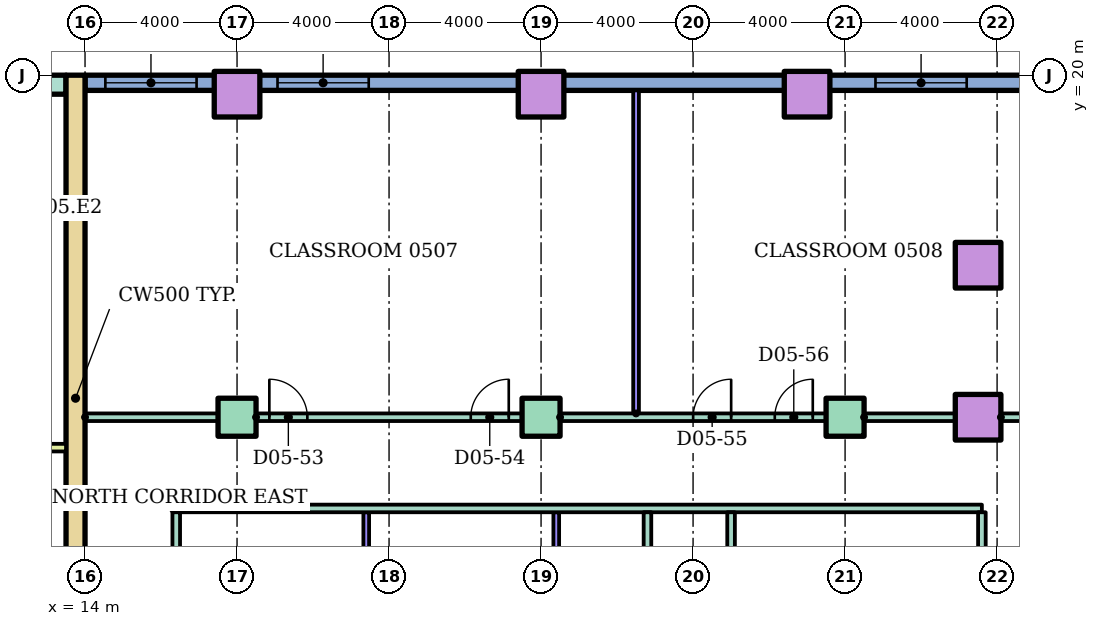
"""IFC4 building model, lengths in metres.
Left out: names, types, materials, properties, quantities, classifications, styles, units other than length and angle.
Written with IfcOpenShell. Run it as: python <this file> out.ifc"""

import sys

from ifc_helpers import new_model, si_unit, direction, frame, frame_2d, origin, origin_2d, place, context, subcontext, project, spatial, rectangle, hollow_rectangle, extrude, element, fill, save


model = new_model("IFC4")
c1 = context("Model", 3, precision=1e-05, world=origin(), true_north=direction((0.0, 1.0)))
c2 = subcontext(c1, "Body", "Model", "MODEL_VIEW")
j1 = project(units=[si_unit("LENGTHUNIT", "METRE"), si_unit("PLANEANGLEUNIT", "RADIAN")], contexts=[c1])
p1 = place(None, origin())
s1 = spatial("IfcSite", under=j1, at=p1, CompositionType="ELEMENT")
p2 = place(p1, origin())
s2 = spatial("IfcBuilding", under=s1, at=p2, CompositionType="ELEMENT")
p3 = place(p2, frame((0.0, 0.0, 22.0)))
s3 = spatial("IfcBuildingStorey", under=s2, at=p3, CompositionType="ELEMENT", Elevation=22.0)
for number, where in (
    (1, (18.0, 11.0, 0.0)),
    (2, (26.0, 11.0, 0.0)),
    (3, (34.0, 11.0, 0.0)),
):
    element("IfcColumn", number, at=place(p3, frame(where)), inside=s3, PredefinedType="COLUMN", context=c2, shape_type="SweptSolid", body=[
        extrude(rectangle(XDim=1.0, YDim=1.0, at=origin_2d()), origin(), (0.0, 0.0, 1.0), 4.0),
    ])
for number, where in (
    (4, (37.5, 11.0, 0.0)),
    (5, (37.5, 15.0, 0.0)),
    (6, (18.0, 19.5, 0.0)),
    (7, (26.0, 19.5, 0.0)),
    (8, (33.0, 19.5, 0.0)),
):
    element("IfcColumn", number, at=place(p3, frame(where)), inside=s3, PredefinedType="COLUMN", context=c2, shape_type="SweptSolid", body=[
        extrude(hollow_rectangle(XDim=1.2, YDim=1.2, WallThickness=0.06, at=origin_2d()), origin(), (0.0, 0.0, 1.0), 4.0),
    ])
p4 = place(p3, frame((39.6, 19.8, 0.0), z_axis=(0.0, 0.0, 1.0), x_axis=(-1.0, 0.0, 0.0)))
e9 = element("IfcWall", 9, at=p4, inside=s3, PredefinedType="STANDARD", context=c2, shape_type="SweptSolid", body=[
    extrude(rectangle(XDim=25.6, YDim=0.4, at=frame_2d((12.8, 0.0))), origin(), (0.0, 0.0, 1.0), 3.7),
])
p5 = place(p4, frame((2.4, 0.0, 0.9)))
e10 = element("IfcOpeningElement", 10, at=p5, cuts=e9, PredefinedType="OPENING", context=c2, shape_type="SweptSolid", body=[
    extrude(rectangle(XDim=2.4, YDim=2.1, at=frame_2d((1.2, 1.05))), frame((0.0, 0.21, 0.0), z_axis=(0.0, -1.0, 0.0), x_axis=(1.0, 0.0, 0.0)), (0.0, 0.0, 1.0), 0.42),
])
p6 = place(p4, frame((18.135, 0.0, 0.9)))
e11 = element("IfcOpeningElement", 11, at=p6, cuts=e9, PredefinedType="OPENING", context=c2, shape_type="SweptSolid", body=[
    extrude(rectangle(XDim=2.4, YDim=2.1, at=frame_2d((1.2, 1.05))), frame((0.0, 0.21, 0.0), z_axis=(0.0, -1.0, 0.0), x_axis=(1.0, 0.0, 0.0)), (0.0, 0.0, 1.0), 0.42),
])
p7 = place(p4, frame((22.665, 0.0, 0.9)))
e12 = element("IfcOpeningElement", 12, at=p7, cuts=e9, PredefinedType="OPENING", context=c2, shape_type="SweptSolid", body=[
    extrude(rectangle(XDim=2.4, YDim=2.1, at=frame_2d((1.2, 1.05))), frame((0.0, 0.21, 0.0), z_axis=(0.0, -1.0, 0.0), x_axis=(1.0, 0.0, 0.0)), (0.0, 0.0, 1.0), 0.42),
])
p8 = place(p3, frame((13.75, 3.0, 0.0), z_axis=(0.0, 0.0, 1.0), x_axis=(0.0, 1.0, 0.0)))
e13 = element("IfcWall", 13, at=p8, inside=s3, PredefinedType="SHEAR", context=c2, shape_type="SweptSolid", body=[
    extrude(rectangle(XDim=17.0, YDim=0.5, at=frame_2d((8.5, 0.0))), origin(), (0.0, 0.0, 1.0), 3.2),
])
p9 = place(p3, frame((-13.5, 19.75, 0.0)))
e14 = element("IfcWall", 14, at=p9, inside=s3, PredefinedType="SHEAR", context=c2, shape_type="SweptSolid", body=[
    extrude(rectangle(XDim=27.0, YDim=0.5, at=frame_2d((13.5, 0.0))), origin(), (0.0, 0.0, 1.0), 3.2),
])
p10 = place(p3, frame((9.6, 10.2, 0.0)))
e15 = element("IfcWall", 15, at=p10, inside=s3, PredefinedType="PARTITIONING", context=c2, shape_type="SweptSolid", body=[
    extrude(rectangle(XDim=3.9, YDim=0.2, at=frame_2d((1.95, 0.0))), origin(), (0.0, 0.0, 1.0), 3.2),
])
p11 = place(p3, frame((16.3, 8.6, 0.0)))
e16 = element("IfcWall", 16, at=p11, inside=s3, PredefinedType="PARTITIONING", context=c2, shape_type="SweptSolid", body=[
    extrude(rectangle(XDim=21.3, YDim=0.2, at=frame_2d((10.65, 0.0))), origin(), (0.0, 0.0, 1.0), 3.2),
])
p12 = place(p3, frame((14.0, 11.0, 0.0)))
e17 = element("IfcWall", 17, at=p12, inside=s3, PredefinedType="PARTITIONING", context=c2, shape_type="SweptSolid", body=[
    extrude(rectangle(XDim=3.5, YDim=0.2, at=frame_2d((1.75, 0.0))), origin(), (0.0, 0.0, 1.0), 3.2),
])
p13 = place(p3, frame((18.5, 11.0, 0.0)))
e18 = element("IfcWall", 18, at=p13, inside=s3, PredefinedType="PARTITIONING", context=c2, shape_type="SweptSolid", body=[
    extrude(rectangle(XDim=7.0, YDim=0.2, at=frame_2d((3.5, 0.0))), origin(), (0.0, 0.0, 1.0), 3.2),
])
p14 = place(p13, frame((0.35, 0.0, 0.0)))
e19 = element("IfcOpeningElement", 19, at=p14, cuts=e18, PredefinedType="OPENING", context=c2, shape_type="SweptSolid", body=[
    extrude(rectangle(XDim=1.0, YDim=2.1, at=frame_2d((0.5, 1.05))), frame((0.0, 0.11, 0.0), z_axis=(0.0, -1.0, 0.0), x_axis=(1.0, 0.0, 0.0)), (0.0, 0.0, 1.0), 0.22),
])
p15 = place(p13, frame((5.65, 0.0, 0.0)))
e20 = element("IfcOpeningElement", 20, at=p15, cuts=e18, PredefinedType="OPENING", context=c2, shape_type="SweptSolid", body=[
    extrude(rectangle(XDim=1.0, YDim=2.1, at=frame_2d((0.5, 1.05))), frame((0.0, 0.11, 0.0), z_axis=(0.0, -1.0, 0.0), x_axis=(1.0, 0.0, 0.0)), (0.0, 0.0, 1.0), 0.22),
])
p16 = place(p3, frame((26.5, 11.0, 0.0)))
e21 = element("IfcWall", 21, at=p16, inside=s3, PredefinedType="PARTITIONING", context=c2, shape_type="SweptSolid", body=[
    extrude(rectangle(XDim=7.0, YDim=0.2, at=frame_2d((3.5, 0.0))), origin(), (0.0, 0.0, 1.0), 3.2),
])
p17 = place(p16, frame((3.502, 0.0, 0.0)))
e22 = element("IfcOpeningElement", 22, at=p17, cuts=e21, PredefinedType="OPENING", context=c2, shape_type="SweptSolid", body=[
    extrude(rectangle(XDim=1.0, YDim=2.1, at=frame_2d((0.5, 1.05))), frame((0.0, 0.11, 0.0), z_axis=(0.0, -1.0, 0.0), x_axis=(1.0, 0.0, 0.0)), (0.0, 0.0, 1.0), 0.22),
])
p18 = place(p16, frame((5.65, 0.0, 0.0)))
e23 = element("IfcOpeningElement", 23, at=p18, cuts=e21, PredefinedType="OPENING", context=c2, shape_type="SweptSolid", body=[
    extrude(rectangle(XDim=1.0, YDim=2.1, at=frame_2d((0.5, 1.05))), frame((0.0, 0.11, 0.0), z_axis=(0.0, -1.0, 0.0), x_axis=(1.0, 0.0, 0.0)), (0.0, 0.0, 1.0), 0.22),
])
p19 = place(p3, frame((34.5, 11.0, 0.0)))
e24 = element("IfcWall", 24, at=p19, inside=s3, PredefinedType="PARTITIONING", context=c2, shape_type="SweptSolid", body=[
    extrude(rectangle(XDim=2.4, YDim=0.2, at=frame_2d((1.2, 0.0))), origin(), (0.0, 0.0, 1.0), 3.2),
])
p20 = place(p3, frame((38.1, 11.0, 0.0)))
e25 = element("IfcWall", 25, at=p20, inside=s3, PredefinedType="PARTITIONING", context=c2, shape_type="SweptSolid", body=[
    extrude(rectangle(XDim=1.5, YDim=0.2, at=frame_2d((0.75, 0.0))), origin(), (0.0, 0.0, 1.0), 3.2),
])
p21 = place(p3, frame((16.4, 1.5, 0.0), z_axis=(0.0, 0.0, 1.0), x_axis=(0.0, 1.0, 0.0)))
e26 = element("IfcWall", 26, at=p21, inside=s3, PredefinedType="PARTITIONING", context=c2, shape_type="SweptSolid", body=[
    extrude(rectangle(XDim=7.0, YDim=0.2, at=frame_2d((3.5, 0.0))), origin(), (0.0, 0.0, 1.0), 3.2),
])
p22 = place(p3, frame((21.4, 1.5, 0.0), z_axis=(0.0, 0.0, 1.0), x_axis=(0.0, 1.0, 0.0)))
e27 = element("IfcWall", 27, at=p22, inside=s3, PredefinedType="PARTITIONING", context=c2, shape_type="SweptSolid", body=[
    extrude(rectangle(XDim=7.0, YDim=0.15, at=frame_2d((3.5, 0.0))), origin(), (0.0, 0.0, 1.0), 3.2),
])
p23 = place(p3, frame((26.4, 2.5, 0.0), z_axis=(0.0, 0.0, 1.0), x_axis=(0.0, 1.0, 0.0)))
e28 = element("IfcWall", 28, at=p23, inside=s3, PredefinedType="PARTITIONING", context=c2, shape_type="SweptSolid", body=[
    extrude(rectangle(XDim=6.0, YDim=0.15, at=frame_2d((3.0, 0.0))), origin(), (0.0, 0.0, 1.0), 3.2),
])
p24 = place(p3, frame((28.5, 11.1, 0.0), z_axis=(0.0, 0.0, 1.0), x_axis=(0.0, 1.0, 0.0)))
e29 = element("IfcWall", 29, at=p24, inside=s3, PredefinedType="PARTITIONING", context=c2, shape_type="SweptSolid", body=[
    extrude(rectangle(XDim=8.5, YDim=0.15, at=frame_2d((4.25, 0.0))), origin(), (0.0, 0.0, 1.0), 3.2),
])
for number, where, z_axis, x_axis in (
    (30, (28.8, 1.5, 0.0), (0.0, 0.0, 1.0), (0.0, 1.0, 0.0)),
    (31, (31.0, 1.5, 0.0), (0.0, 0.0, 1.0), (0.0, 1.0, 0.0)),
):
    element("IfcWall", number, at=place(p3, frame(where, z_axis=z_axis, x_axis=x_axis)), inside=s3, PredefinedType="PARTITIONING", context=c2, shape_type="SweptSolid", body=[
        extrude(rectangle(XDim=7.0, YDim=0.2, at=frame_2d((3.5, 0.0))), origin(), (0.0, 0.0, 1.0), 3.2),
    ])
p25 = place(p3, frame((37.6, 2.6, 0.0), z_axis=(0.0, 0.0, 1.0), x_axis=(0.0, 1.0, 0.0)))
e32 = element("IfcWall", 32, at=p25, inside=s3, PredefinedType="PARTITIONING", context=c2, shape_type="SweptSolid", body=[
    extrude(rectangle(XDim=5.9, YDim=0.2, at=frame_2d((2.95, 0.0))), origin(), (0.0, 0.0, 1.0), 3.2),
])
p26 = place(p25, frame((1.95, 0.0, 0.0)))
e33 = element("IfcOpeningElement", 33, at=p26, cuts=e32, PredefinedType="OPENING", context=c2, shape_type="SweptSolid", body=[
    extrude(rectangle(XDim=0.9, YDim=2.1, at=frame_2d((0.45, 1.05))), frame((0.0, 0.11, 0.0), z_axis=(0.0, -1.0, 0.0), x_axis=(1.0, 0.0, 0.0)), (0.0, 0.0, 1.0), 0.22),
])
p27 = place(p5, origin())
e34 = element("IfcWindow", 34, at=p27, inside=s3, PartitioningType="SINGLE_PANEL", PredefinedType="WINDOW", context=c2, shape_type="SweptSolid", body=[
    extrude(rectangle(XDim=2.4, YDim=2.1, at=frame_2d((1.2, 1.05))), frame((0.0, 0.03, 0.0), z_axis=(0.0, -1.0, 0.0), x_axis=(1.0, 0.0, 0.0)), (0.0, 0.0, 1.0), 0.06),
])
fill(e10, e34)
p28 = place(p6, origin())
e35 = element("IfcWindow", 35, at=p28, inside=s3, PartitioningType="SINGLE_PANEL", PredefinedType="WINDOW", context=c2, shape_type="SweptSolid", body=[
    extrude(rectangle(XDim=2.4, YDim=2.1, at=frame_2d((1.2, 1.05))), frame((0.0, 0.03, 0.0), z_axis=(0.0, -1.0, 0.0), x_axis=(1.0, 0.0, 0.0)), (0.0, 0.0, 1.0), 0.06),
])
fill(e11, e35)
p29 = place(p7, origin())
e36 = element("IfcWindow", 36, at=p29, inside=s3, PartitioningType="SINGLE_PANEL", PredefinedType="WINDOW", context=c2, shape_type="SweptSolid", body=[
    extrude(rectangle(XDim=2.4, YDim=2.1, at=frame_2d((1.2, 1.05))), frame((0.0, 0.03, 0.0), z_axis=(0.0, -1.0, 0.0), x_axis=(1.0, 0.0, 0.0)), (0.0, 0.0, 1.0), 0.06),
])
fill(e12, e36)
p30 = place(p14, origin())
e37 = element("IfcDoor", 37, at=p30, inside=s3, OperationType="SINGLE_SWING_LEFT", PredefinedType="DOOR", context=c2, shape_type="SweptSolid", body=[
    extrude(rectangle(XDim=1.0, YDim=2.1, at=frame_2d((0.5, 1.05))), frame((0.0, 0.025, 0.0), z_axis=(0.0, -1.0, 0.0), x_axis=(1.0, 0.0, 0.0)), (0.0, 0.0, 1.0), 0.05),
])
fill(e19, e37)
p31 = place(p15, origin())
e38 = element("IfcDoor", 38, at=p31, inside=s3, OperationType="SINGLE_SWING_RIGHT", PredefinedType="DOOR", context=c2, shape_type="SweptSolid", body=[
    extrude(rectangle(XDim=1.0, YDim=2.1, at=frame_2d((0.5, 1.05))), frame((0.0, 0.025, 0.0), z_axis=(0.0, -1.0, 0.0), x_axis=(1.0, 0.0, 0.0)), (0.0, 0.0, 1.0), 0.05),
])
fill(e20, e38)
p32 = place(p17, origin())
e39 = element("IfcDoor", 39, at=p32, inside=s3, OperationType="SINGLE_SWING_RIGHT", PredefinedType="DOOR", context=c2, shape_type="SweptSolid", body=[
    extrude(rectangle(XDim=1.0, YDim=2.1, at=frame_2d((0.5, 1.05))), frame((0.0, 0.025, 0.0), z_axis=(0.0, -1.0, 0.0), x_axis=(1.0, 0.0, 0.0)), (0.0, 0.0, 1.0), 0.05),
])
fill(e22, e39)
p33 = place(p18, origin())
e40 = element("IfcDoor", 40, at=p33, inside=s3, OperationType="SINGLE_SWING_RIGHT", PredefinedType="DOOR", context=c2, shape_type="SweptSolid", body=[
    extrude(rectangle(XDim=1.0, YDim=2.1, at=frame_2d((0.5, 1.05))), frame((0.0, 0.025, 0.0), z_axis=(0.0, -1.0, 0.0), x_axis=(1.0, 0.0, 0.0)), (0.0, 0.0, 1.0), 0.05),
])
fill(e23, e40)
save(model, sys.argv[1])
